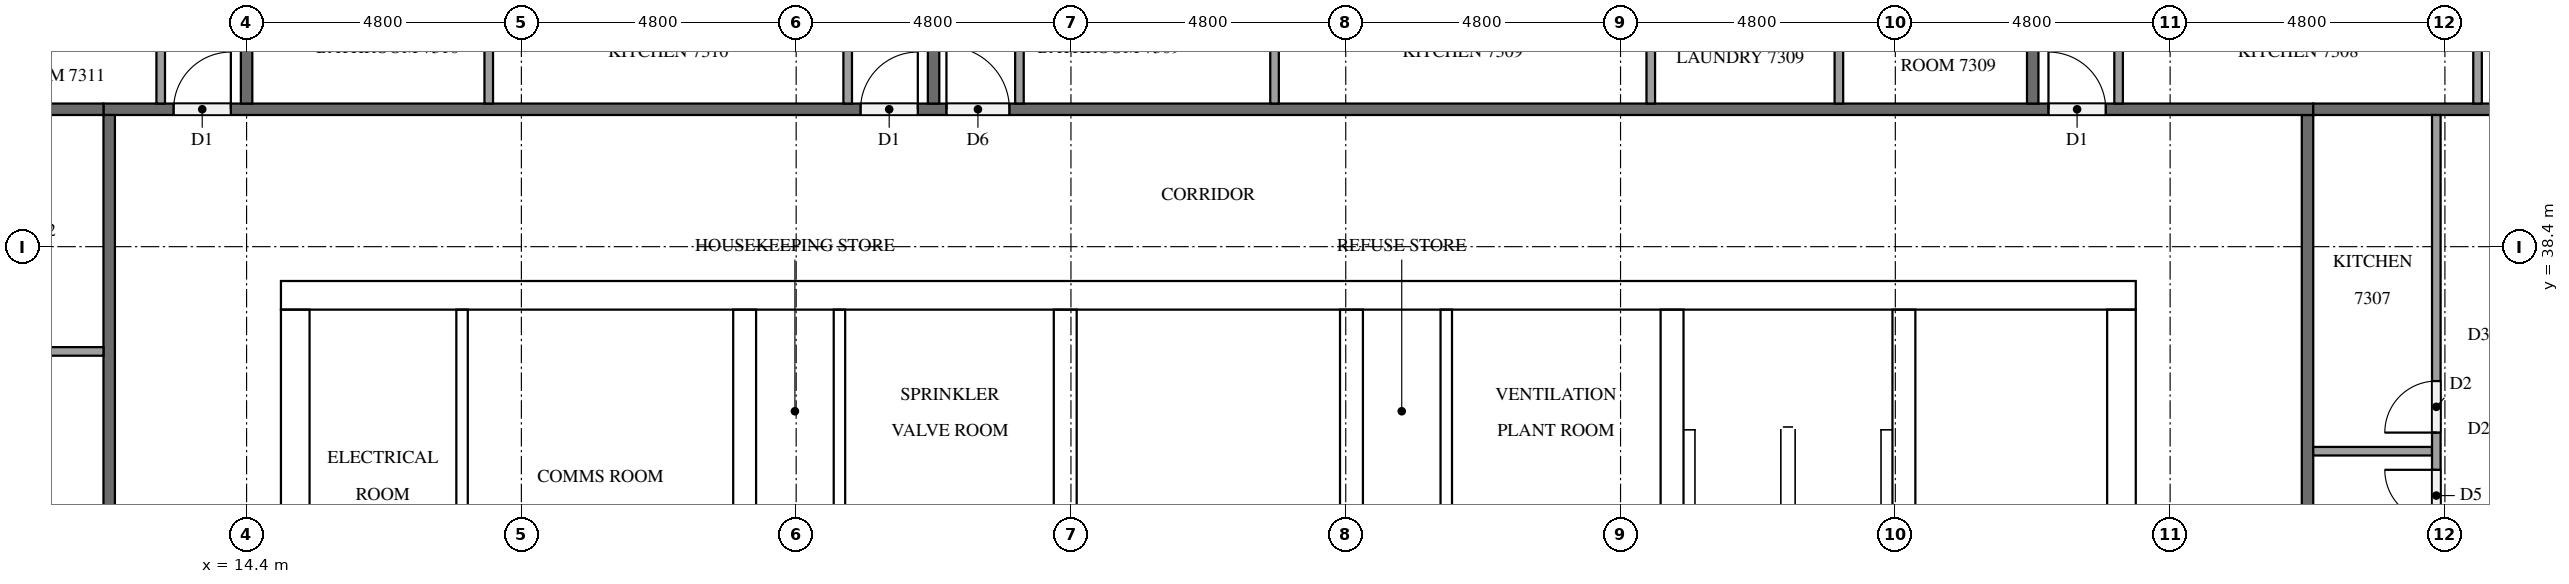
"""IFC4 building model, lengths in metres.
Left out: names, types, materials, properties, quantities, classifications, styles, units other than length and angle.
Written with IfcOpenShell. Run it as: python <this file> out.ifc"""

import sys

from ifc_helpers import new_model, si_unit, direction, frame, frame_2d, origin, place, context, subcontext, project, spatial, rectangle, extrude, element, fill, save


model = new_model("IFC4")
c1 = context("Model", 3, precision=1e-05, world=origin(), true_north=direction((0.0, 1.0)))
c2 = subcontext(c1, "Body", "Model", "MODEL_VIEW")
j1 = project(units=[si_unit("LENGTHUNIT", "METRE"), si_unit("PLANEANGLEUNIT", "RADIAN")], contexts=[c1])
p1 = place(None, origin())
s1 = spatial("IfcSite", under=j1, at=p1, CompositionType="ELEMENT")
p2 = place(p1, origin())
s2 = spatial("IfcBuilding", under=s1, at=p2, CompositionType="ELEMENT")
p3 = place(p2, frame((0.0, 0.0, 279.1)))
s3 = spatial("IfcBuildingStorey", under=s2, at=p3, CompositionType="ELEMENT", Elevation=279.1)
p4 = place(p3, frame((15.0, 37.55, 0.0), z_axis=(0.0, 0.0, 1.0), x_axis=(1.0, 0.0, 0.0)))
e1 = element("IfcWall", 1, at=p4, inside=s3, PredefinedType="SHEAR", context=c2, shape_type="SweptSolid", body=[
    extrude(rectangle(XDim=32.4, YDim=0.5, at=frame_2d((16.2, 0.0))), origin(), (0.0, 0.0, 1.0), 3.2),
])
p5 = place(p4, frame((15.3, 0.0, 0.0)))
e2 = element("IfcOpeningElement", 2, at=p5, cuts=e1, PredefinedType="OPENING", context=c2, shape_type="SweptSolid", body=[
    extrude(rectangle(XDim=1.8, YDim=2.1, at=frame_2d((0.9, 1.05))), frame((0.0, 0.26, 0.0), z_axis=(0.0, -1.0, 0.0), x_axis=(1.0, 0.0, 0.0)), (0.0, 0.0, 1.0), 0.52),
])
p6 = place(p4, frame((1.282, 0.0, 0.0)))
e3 = element("IfcOpeningElement", 3, at=p6, cuts=e1, PredefinedType="OPENING", context=c2, shape_type="SweptSolid", body=[
    extrude(rectangle(XDim=1.0, YDim=2.1, at=frame_2d((0.5, 1.05))), frame((0.0, 0.26, 0.0), z_axis=(0.0, -1.0, 0.0), x_axis=(1.0, 0.0, 0.0)), (0.0, 0.0, 1.0), 0.52),
])
p7 = place(p4, frame((5.082, 0.0, 0.0)))
e4 = element("IfcOpeningElement", 4, at=p7, cuts=e1, PredefinedType="OPENING", context=c2, shape_type="SweptSolid", body=[
    extrude(rectangle(XDim=1.0, YDim=2.1, at=frame_2d((0.5, 1.05))), frame((0.0, 0.26, 0.0), z_axis=(0.0, -1.0, 0.0), x_axis=(1.0, 0.0, 0.0)), (0.0, 0.0, 1.0), 0.52),
])
p8 = place(p3, frame((15.25, 15.5, 0.0), z_axis=(0.0, 0.0, 1.0), x_axis=(0.0, 1.0, 0.0)))
e5 = element("IfcWall", 5, at=p8, inside=s3, PredefinedType="SHEAR", context=c2, shape_type="SweptSolid", body=[
    extrude(rectangle(XDim=21.8, YDim=0.5, at=frame_2d((10.9, 0.0))), origin(), (0.0, 0.0, 1.0), 3.2),
])
p9 = place(p8, frame((5.26, 0.0, 0.0)))
e6 = element("IfcOpeningElement", 6, at=p9, cuts=e5, PredefinedType="OPENING", context=c2, shape_type="SweptSolid", body=[
    extrude(rectangle(XDim=1.2, YDim=2.1, at=frame_2d((0.6, 1.05))), frame((0.0, 0.26, 0.0), z_axis=(0.0, -1.0, 0.0), x_axis=(1.0, 0.0, 0.0)), (0.0, 0.0, 1.0), 0.52),
])
p10 = place(p3, frame((47.15, 15.5, 0.0), z_axis=(0.0, 0.0, 1.0), x_axis=(0.0, 1.0, 0.0)))
e7 = element("IfcWall", 7, at=p10, inside=s3, PredefinedType="SHEAR", context=c2, shape_type="SweptSolid", body=[
    extrude(rectangle(XDim=21.8, YDim=0.5, at=frame_2d((10.9, 0.0))), origin(), (0.0, 0.0, 1.0), 3.2),
])
p11 = place(p10, frame((10.6, 0.0, 0.0)))
e8 = element("IfcOpeningElement", 8, at=p11, cuts=e7, PredefinedType="OPENING", context=c2, shape_type="SweptSolid", body=[
    extrude(rectangle(XDim=1.2, YDim=2.1, at=frame_2d((0.6, 1.05))), frame((0.0, 0.26, 0.0), z_axis=(0.0, -1.0, 0.0), x_axis=(1.0, 0.0, 0.0)), (0.0, 0.0, 1.0), 0.52),
])
p12 = place(p3, frame((23.1, 15.5, 0.0), z_axis=(0.0, 0.0, 1.0), x_axis=(0.0, 1.0, 0.0)))
e9 = element("IfcWall", 9, at=p12, inside=s3, PredefinedType="SHEAR", context=c2, shape_type="SweptSolid", body=[
    extrude(rectangle(XDim=21.8, YDim=0.4, at=frame_2d((10.9, 0.0))), origin(), (0.0, 0.0, 1.0), 3.2),
])
p13 = place(p3, frame((39.3, 27.75, 0.0), z_axis=(0.0, 0.0, 1.0), x_axis=(0.0, 1.0, 0.0)))
e10 = element("IfcWall", 10, at=p13, inside=s3, PredefinedType="SHEAR", context=c2, shape_type="SweptSolid", body=[
    extrude(rectangle(XDim=9.55, YDim=0.4, at=frame_2d((4.775, 0.0))), origin(), (0.0, 0.0, 1.0), 3.2),
])
p14 = place(p3, frame((43.35, 27.75, 0.0), z_axis=(0.0, 0.0, 1.0), x_axis=(0.0, 1.0, 0.0)))
e11 = element("IfcWall", 11, at=p14, inside=s3, PredefinedType="SHEAR", context=c2, shape_type="SweptSolid", body=[
    extrude(rectangle(XDim=9.55, YDim=0.4, at=frame_2d((4.775, 0.0))), origin(), (0.0, 0.0, 1.0), 3.2),
])
p15 = place(p14, frame((7.65, 0.0, 0.0)))
e12 = element("IfcOpeningElement", 12, at=p15, cuts=e11, PredefinedType="OPENING", context=c2, shape_type="SweptSolid", body=[
    extrude(rectangle(XDim=1.2, YDim=2.1, at=frame_2d((0.6, 1.05))), frame((0.0, 0.21, 0.0), z_axis=(0.0, -1.0, 0.0), x_axis=(1.0, 0.0, 0.0)), (0.0, 0.0, 1.0), 0.42),
])
for number, where, z_axis, x_axis in (
    (13, (28.7, 33.75, 0.0), (0.0, 0.0, 1.0), (0.0, 1.0, 0.0)),
    (14, (33.7, 33.75, 0.0), (0.0, 0.0, 1.0), (0.0, 1.0, 0.0)),
):
    element("IfcWall", number, at=place(p3, frame(where, z_axis=z_axis, x_axis=x_axis)), inside=s3, PredefinedType="SHEAR", context=c2, shape_type="SweptSolid", body=[
        extrude(rectangle(XDim=3.55, YDim=0.4, at=frame_2d((1.775, 0.0))), origin(), (0.0, 0.0, 1.0), 3.2),
    ])
p16 = place(p3, frame((18.164, 31.45, 0.0), z_axis=(0.0, 0.0, 1.0), x_axis=(0.0, 1.0, 0.0)))
e15 = element("IfcWall", 15, at=p16, inside=s3, PredefinedType="PARTITIONING", context=c2, shape_type="SweptSolid", body=[
    extrude(rectangle(XDim=5.85, YDim=0.2, at=frame_2d((2.925, 0.0))), origin(), (0.0, 0.0, 1.0), 3.2),
])
for number, where, z_axis, x_axis in (
    (16, (24.756, 33.75, 0.0), (0.0, 0.0, 1.0), (0.0, 1.0, 0.0)),
    (17, (35.356, 33.75, 0.0), (0.0, 0.0, 1.0), (0.0, 1.0, 0.0)),
):
    element("IfcWall", number, at=place(p3, frame(where, z_axis=z_axis, x_axis=x_axis)), inside=s3, PredefinedType="PARTITIONING", context=c2, shape_type="SweptSolid", body=[
        extrude(rectangle(XDim=3.55, YDim=0.2, at=frame_2d((1.775, 0.0))), origin(), (0.0, 0.0, 1.0), 3.2),
    ])
p17 = place(p3, frame((50.4, 40.7, 0.0), z_axis=(0.0, 0.0, 1.0), x_axis=(0.0, -1.0, 0.0)))
e18 = element("IfcWall", 18, at=p17, inside=s3, PredefinedType="PARTITIONING", context=c2, shape_type="SweptSolid", body=[
    extrude(rectangle(XDim=28.6, YDim=0.2, at=frame_2d((14.3, 0.0))), origin(), (0.0, 0.0, 1.0), 3.2),
])
p18 = place(p17, frame((27.425, 0.0, 0.0)))
e19 = element("IfcOpeningElement", 19, at=p18, cuts=e18, PredefinedType="OPENING", context=c2, shape_type="SweptSolid", body=[
    extrude(rectangle(XDim=1.0, YDim=2.1, at=frame_2d((0.5, 1.05))), frame((0.0, 0.11, 0.0), z_axis=(0.0, -1.0, 0.0), x_axis=(1.0, 0.0, 0.0)), (0.0, 0.0, 1.0), 0.22),
])
p19 = place(p17, frame((13.025, 0.0, 0.0)))
e20 = element("IfcOpeningElement", 20, at=p19, cuts=e18, PredefinedType="OPENING", context=c2, shape_type="SweptSolid", body=[
    extrude(rectangle(XDim=1.0, YDim=2.1, at=frame_2d((0.5, 1.05))), frame((0.0, 0.11, 0.0), z_axis=(0.0, -1.0, 0.0), x_axis=(1.0, 0.0, 0.0)), (0.0, 0.0, 1.0), 0.22),
])
p20 = place(p3, frame((11.9, 40.8, 0.0), z_axis=(0.0, 0.0, 1.0), x_axis=(1.0, 0.0, 0.0)))
e21 = element("IfcWall", 21, at=p20, inside=s3, PredefinedType="PARTITIONING", context=c2, shape_type="SweptSolid", body=[
    extrude(rectangle(XDim=38.6, YDim=0.2, at=frame_2d((19.3, 0.0))), origin(), (0.0, 0.0, 1.0), 3.2),
])
p21 = place(p20, frame((33.975, 0.0, 0.0)))
e22 = element("IfcOpeningElement", 22, at=p21, cuts=e21, PredefinedType="OPENING", context=c2, shape_type="SweptSolid", body=[
    extrude(rectangle(XDim=1.0, YDim=2.1, at=frame_2d((0.5, 1.05))), frame((0.0, 0.11, 0.0), z_axis=(0.0, -1.0, 0.0), x_axis=(1.0, 0.0, 0.0)), (0.0, 0.0, 1.0), 0.22),
])
p22 = place(p20, frame((14.725, 0.0, 0.0)))
e23 = element("IfcOpeningElement", 23, at=p22, cuts=e21, PredefinedType="OPENING", context=c2, shape_type="SweptSolid", body=[
    extrude(rectangle(XDim=1.1, YDim=2.1, at=frame_2d((0.55, 1.05))), frame((0.0, 0.11, 0.0), z_axis=(0.0, -1.0, 0.0), x_axis=(1.0, 0.0, 0.0)), (0.0, 0.0, 1.0), 0.22),
])
p23 = place(p20, frame((13.225, 0.0, 0.0)))
e24 = element("IfcOpeningElement", 24, at=p23, cuts=e21, PredefinedType="OPENING", context=c2, shape_type="SweptSolid", body=[
    extrude(rectangle(XDim=1.0, YDim=2.1, at=frame_2d((0.5, 1.05))), frame((0.0, 0.11, 0.0), z_axis=(0.0, -1.0, 0.0), x_axis=(1.0, 0.0, 0.0)), (0.0, 0.0, 1.0), 0.22),
])
p24 = place(p20, frame((1.225, 0.0, 0.0)))
e25 = element("IfcOpeningElement", 25, at=p24, cuts=e21, PredefinedType="OPENING", context=c2, shape_type="SweptSolid", body=[
    extrude(rectangle(XDim=1.0, YDim=2.1, at=frame_2d((0.5, 1.05))), frame((0.0, 0.11, 0.0), z_axis=(0.0, -1.0, 0.0), x_axis=(1.0, 0.0, 0.0)), (0.0, 0.0, 1.0), 0.22),
])
p25 = place(p3, frame((12.0, 12.1, 0.0), z_axis=(0.0, 0.0, 1.0), x_axis=(0.0, 1.0, 0.0)))
e26 = element("IfcWall", 26, at=p25, inside=s3, PredefinedType="PARTITIONING", context=c2, shape_type="SweptSolid", body=[
    extrude(rectangle(XDim=28.6, YDim=0.2, at=frame_2d((14.3, 0.0))), origin(), (0.0, 0.0, 1.0), 3.2),
])
p26 = place(p25, frame((16.975, 0.0, 0.0)))
e27 = element("IfcOpeningElement", 27, at=p26, cuts=e26, PredefinedType="OPENING", context=c2, shape_type="SweptSolid", body=[
    extrude(rectangle(XDim=1.0, YDim=2.1, at=frame_2d((0.5, 1.05))), frame((0.0, 0.11, 0.0), z_axis=(0.0, -1.0, 0.0), x_axis=(1.0, 0.0, 0.0)), (0.0, 0.0, 1.0), 0.22),
])
p27 = place(p25, frame((0.175, 0.0, 0.0)))
e28 = element("IfcOpeningElement", 28, at=p27, cuts=e26, PredefinedType="OPENING", context=c2, shape_type="SweptSolid", body=[
    extrude(rectangle(XDim=1.0, YDim=2.1, at=frame_2d((0.5, 1.05))), frame((0.0, 0.11, 0.0), z_axis=(0.0, -1.0, 0.0), x_axis=(1.0, 0.0, 0.0)), (0.0, 0.0, 1.0), 0.22),
])
for number, where, z_axis, x_axis in (
    (29, (50.5, 40.8, 0.0), (0.0, 0.0, 1.0), (1.0, 0.0, 0.0)),
    (30, (45.6, 47.9, 0.0), (0.0, 0.0, 1.0), (0.0, -1.0, 0.0)),
    (31, (26.4, 47.9, 0.0), (0.0, 0.0, 1.0), (0.0, -1.0, 0.0)),
):
    element("IfcWall", number, at=place(p3, frame(where, z_axis=z_axis, x_axis=x_axis)), inside=s3, PredefinedType="PARTITIONING", context=c2, shape_type="SweptSolid", body=[
        extrude(rectangle(XDim=7.0, YDim=0.2, at=frame_2d((3.5, 0.0))), origin(), (0.0, 0.0, 1.0), 3.2),
    ])
p28 = place(p3, frame((14.4, 47.75, 0.0), z_axis=(0.0, 0.0, 1.0), x_axis=(0.0, -1.0, 0.0)))
e32 = element("IfcWall", 32, at=p28, inside=s3, PredefinedType="PARTITIONING", context=c2, shape_type="SweptSolid", body=[
    extrude(rectangle(XDim=6.85, YDim=0.2, at=frame_2d((3.425, 0.0))), origin(), (0.0, 0.0, 1.0), 3.2),
])
p29 = place(p3, frame((0.1, 40.8, 0.0), z_axis=(0.0, 0.0, 1.0), x_axis=(1.0, 0.0, 0.0)))
e33 = element("IfcWall", 33, at=p29, inside=s3, PredefinedType="PARTITIONING", context=c2, shape_type="SweptSolid", body=[
    extrude(rectangle(XDim=11.8, YDim=0.2, at=frame_2d((5.9, 0.0))), origin(), (0.0, 0.0, 1.0), 3.2),
])
p30 = place(p3, frame((50.5, 34.827, 0.0), z_axis=(0.0, 0.0, 1.0), x_axis=(1.0, 0.0, 0.0)))
e34 = element("IfcWall", 34, at=p30, inside=s3, PredefinedType="PARTITIONING", context=c2, shape_type="SweptSolid", body=[
    extrude(rectangle(XDim=2.075, YDim=0.15, at=frame_2d((1.038, 0.0))), origin(), (0.0, 0.0, 1.0), 3.2),
])
p31 = place(p3, frame((52.65, 27.975, 0.0), z_axis=(0.0, 0.0, 1.0), x_axis=(0.0, 1.0, 0.0)))
e35 = element("IfcWall", 35, at=p31, inside=s3, PredefinedType="PARTITIONING", context=c2, shape_type="SweptSolid", body=[
    extrude(rectangle(XDim=12.725, YDim=0.15, at=frame_2d((6.362, 0.0))), origin(), (0.0, 0.0, 1.0), 3.2),
])
p32 = place(p31, frame((0.3, 0.0, 0.0)))
e36 = element("IfcOpeningElement", 36, at=p32, cuts=e35, PredefinedType="OPENING", context=c2, shape_type="SweptSolid", body=[
    extrude(rectangle(XDim=0.8, YDim=2.1, at=frame_2d((0.4, 1.05))), frame((0.0, 0.085, 0.0), z_axis=(0.0, -1.0, 0.0), x_axis=(1.0, 0.0, 0.0)), (0.0, 0.0, 1.0), 0.17),
])
p33 = place(p31, frame((5.627, 0.0, 0.0)))
e37 = element("IfcOpeningElement", 37, at=p33, cuts=e35, PredefinedType="OPENING", context=c2, shape_type="SweptSolid", body=[
    extrude(rectangle(XDim=0.9, YDim=2.1, at=frame_2d((0.45, 1.05))), frame((0.0, 0.085, 0.0), z_axis=(0.0, -1.0, 0.0), x_axis=(1.0, 0.0, 0.0)), (0.0, 0.0, 1.0), 0.17),
])
p34 = place(p31, frame((7.177, 0.0, 0.0)))
e38 = element("IfcOpeningElement", 38, at=p34, cuts=e35, PredefinedType="OPENING", context=c2, shape_type="SweptSolid", body=[
    extrude(rectangle(XDim=0.9, YDim=2.1, at=frame_2d((0.45, 1.05))), frame((0.0, 0.085, 0.0), z_axis=(0.0, -1.0, 0.0), x_axis=(1.0, 0.0, 0.0)), (0.0, 0.0, 1.0), 0.17),
])
p35 = place(p3, frame((53.37, 40.9, 0.0), z_axis=(0.0, 0.0, 1.0), x_axis=(0.0, 1.0, 0.0)))
e39 = element("IfcWall", 39, at=p35, inside=s3, PredefinedType="PARTITIONING", context=c2, shape_type="SweptSolid", body=[
    extrude(rectangle(XDim=1.775, YDim=0.15, at=frame_2d((0.888, 0.0))), origin(), (0.0, 0.0, 1.0), 3.2),
])
p36 = place(p3, frame((47.1, 40.9, 0.0), z_axis=(0.0, 0.0, 1.0), x_axis=(0.0, 1.0, 0.0)))
e40 = element("IfcWall", 40, at=p36, inside=s3, PredefinedType="PARTITIONING", context=c2, shape_type="SweptSolid", body=[
    extrude(rectangle(XDim=1.925, YDim=0.15, at=frame_2d((0.962, 0.0))), origin(), (0.0, 0.0, 1.0), 3.2),
])
for number, where, z_axis, x_axis in (
    (41, (32.356, 40.9, 0.0), (0.0, 0.0, 1.0), (0.0, 1.0, 0.0)),
    (42, (38.928, 40.9, 0.0), (0.0, 0.0, 1.0), (0.0, 1.0, 0.0)),
    (43, (42.214, 40.9, 0.0), (0.0, 0.0, 1.0), (0.0, 1.0, 0.0)),
):
    element("IfcWall", number, at=place(p3, frame(where, z_axis=z_axis, x_axis=x_axis)), inside=s3, PredefinedType="PARTITIONING", context=c2, shape_type="SweptSolid", body=[
        extrude(rectangle(XDim=1.775, YDim=0.15, at=frame_2d((0.888, 0.0))), origin(), (0.0, 0.0, 1.0), 3.2),
    ])
p37 = place(p3, frame((27.9, 40.9, 0.0), z_axis=(0.0, 0.0, 1.0), x_axis=(0.0, 1.0, 0.0)))
e44 = element("IfcWall", 44, at=p37, inside=s3, PredefinedType="PARTITIONING", context=c2, shape_type="SweptSolid", body=[
    extrude(rectangle(XDim=1.925, YDim=0.15, at=frame_2d((0.962, 0.0))), origin(), (0.0, 0.0, 1.0), 3.2),
])
p38 = place(p3, frame((18.63, 40.9, 0.0), z_axis=(0.0, 0.0, 1.0), x_axis=(0.0, 1.0, 0.0)))
e45 = element("IfcWall", 45, at=p38, inside=s3, PredefinedType="PARTITIONING", context=c2, shape_type="SweptSolid", body=[
    extrude(rectangle(XDim=1.775, YDim=0.15, at=frame_2d((0.888, 0.0))), origin(), (0.0, 0.0, 1.0), 3.2),
])
p39 = place(p3, frame((24.9, 40.9, 0.0), z_axis=(0.0, 0.0, 1.0), x_axis=(0.0, 1.0, 0.0)))
e46 = element("IfcWall", 46, at=p39, inside=s3, PredefinedType="PARTITIONING", context=c2, shape_type="SweptSolid", body=[
    extrude(rectangle(XDim=1.925, YDim=0.15, at=frame_2d((0.962, 0.0))), origin(), (0.0, 0.0, 1.0), 3.2),
])
p40 = place(p3, frame((12.9, 40.9, 0.0), z_axis=(0.0, 0.0, 1.0), x_axis=(0.0, 1.0, 0.0)))
e47 = element("IfcWall", 47, at=p40, inside=s3, PredefinedType="PARTITIONING", context=c2, shape_type="SweptSolid", body=[
    extrude(rectangle(XDim=2.075, YDim=0.15, at=frame_2d((1.038, 0.0))), origin(), (0.0, 0.0, 1.0), 3.2),
])
p41 = place(p3, frame((11.9, 36.57, 0.0), z_axis=(0.0, 0.0, 1.0), x_axis=(-1.0, 0.0, 0.0)))
e48 = element("IfcWall", 48, at=p41, inside=s3, PredefinedType="PARTITIONING", context=c2, shape_type="SweptSolid", body=[
    extrude(rectangle(XDim=4.175, YDim=0.15, at=frame_2d((2.087, 0.0))), origin(), (0.0, 0.0, 1.0), 3.2),
])
p42 = place(p15, origin())
e49 = element("IfcDoor", 49, at=p42, inside=s3, OperationType="SINGLE_SWING_LEFT", PredefinedType="DOOR", context=c2, shape_type="SweptSolid", body=[
    extrude(rectangle(XDim=1.2, YDim=2.1, at=frame_2d((0.6, 1.05))), frame((0.0, 0.025, 0.0), z_axis=(0.0, -1.0, 0.0), x_axis=(1.0, 0.0, 0.0)), (0.0, 0.0, 1.0), 0.05),
])
fill(e12, e49)
p43 = place(p5, origin())
e50 = element("IfcDoor", 50, at=p43, inside=s3, OperationType="DOUBLE_DOOR_SINGLE_SWING", PredefinedType="DOOR", context=c2, shape_type="SweptSolid", body=[
    extrude(rectangle(XDim=1.8, YDim=2.1, at=frame_2d((0.9, 1.05))), frame((0.0, 0.025, 0.0), z_axis=(0.0, -1.0, 0.0), x_axis=(1.0, 0.0, 0.0)), (0.0, 0.0, 1.0), 0.05),
])
fill(e2, e50)
p44 = place(p6, origin())
e51 = element("IfcDoor", 51, at=p44, inside=s3, OperationType="SINGLE_SWING_RIGHT", PredefinedType="DOOR", context=c2, shape_type="SweptSolid", body=[
    extrude(rectangle(XDim=1.0, YDim=2.1, at=frame_2d((0.5, 1.05))), frame((0.0, 0.025, 0.0), z_axis=(0.0, -1.0, 0.0), x_axis=(1.0, 0.0, 0.0)), (0.0, 0.0, 1.0), 0.05),
])
fill(e3, e51)
p45 = place(p7, origin())
e52 = element("IfcDoor", 52, at=p45, inside=s3, OperationType="SINGLE_SWING_LEFT", PredefinedType="DOOR", context=c2, shape_type="SweptSolid", body=[
    extrude(rectangle(XDim=1.0, YDim=2.1, at=frame_2d((0.5, 1.05))), frame((0.0, 0.025, 0.0), z_axis=(0.0, -1.0, 0.0), x_axis=(1.0, 0.0, 0.0)), (0.0, 0.0, 1.0), 0.05),
])
fill(e4, e52)
p46 = place(p21, origin())
e53 = element("IfcDoor", 53, at=p46, inside=s3, OperationType="SINGLE_SWING_LEFT", PredefinedType="DOOR", context=c2, shape_type="SweptSolid", body=[
    extrude(rectangle(XDim=1.0, YDim=2.1, at=frame_2d((0.5, 1.05))), frame((0.0, 0.025, 0.0), z_axis=(0.0, -1.0, 0.0), x_axis=(1.0, 0.0, 0.0)), (0.0, 0.0, 1.0), 0.05),
])
fill(e22, e53)
p47 = place(p22, origin())
e54 = element("IfcDoor", 54, at=p47, inside=s3, OperationType="SINGLE_SWING_LEFT", PredefinedType="DOOR", context=c2, shape_type="SweptSolid", body=[
    extrude(rectangle(XDim=1.1, YDim=2.1, at=frame_2d((0.55, 1.05))), frame((0.0, 0.025, 0.0), z_axis=(0.0, -1.0, 0.0), x_axis=(1.0, 0.0, 0.0)), (0.0, 0.0, 1.0), 0.05),
])
fill(e23, e54)
p48 = place(p23, origin())
e55 = element("IfcDoor", 55, at=p48, inside=s3, OperationType="SINGLE_SWING_RIGHT", PredefinedType="DOOR", context=c2, shape_type="SweptSolid", body=[
    extrude(rectangle(XDim=1.0, YDim=2.1, at=frame_2d((0.5, 1.05))), frame((0.0, 0.025, 0.0), z_axis=(0.0, -1.0, 0.0), x_axis=(1.0, 0.0, 0.0)), (0.0, 0.0, 1.0), 0.05),
])
fill(e24, e55)
p49 = place(p24, origin())
e56 = element("IfcDoor", 56, at=p49, inside=s3, OperationType="SINGLE_SWING_RIGHT", PredefinedType="DOOR", context=c2, shape_type="SweptSolid", body=[
    extrude(rectangle(XDim=1.0, YDim=2.1, at=frame_2d((0.5, 1.05))), frame((0.0, 0.025, 0.0), z_axis=(0.0, -1.0, 0.0), x_axis=(1.0, 0.0, 0.0)), (0.0, 0.0, 1.0), 0.05),
])
fill(e25, e56)
p50 = place(p33, origin())
e57 = element("IfcDoor", 57, at=p50, inside=s3, OperationType="SINGLE_SWING_RIGHT", PredefinedType="DOOR", context=c2, shape_type="SweptSolid", body=[
    extrude(rectangle(XDim=0.9, YDim=2.1, at=frame_2d((0.45, 1.05))), frame((0.0, 0.025, 0.0), z_axis=(0.0, -1.0, 0.0), x_axis=(1.0, 0.0, 0.0)), (0.0, 0.0, 1.0), 0.05),
])
fill(e37, e57)
p51 = place(p34, origin())
e58 = element("IfcDoor", 58, at=p51, inside=s3, OperationType="SINGLE_SWING_LEFT", PredefinedType="DOOR", context=c2, shape_type="SweptSolid", body=[
    extrude(rectangle(XDim=0.9, YDim=2.1, at=frame_2d((0.45, 1.05))), frame((0.0, 0.025, 0.0), z_axis=(0.0, -1.0, 0.0), x_axis=(1.0, 0.0, 0.0)), (0.0, 0.0, 1.0), 0.05),
])
fill(e38, e58)
save(model, sys.argv[1])
